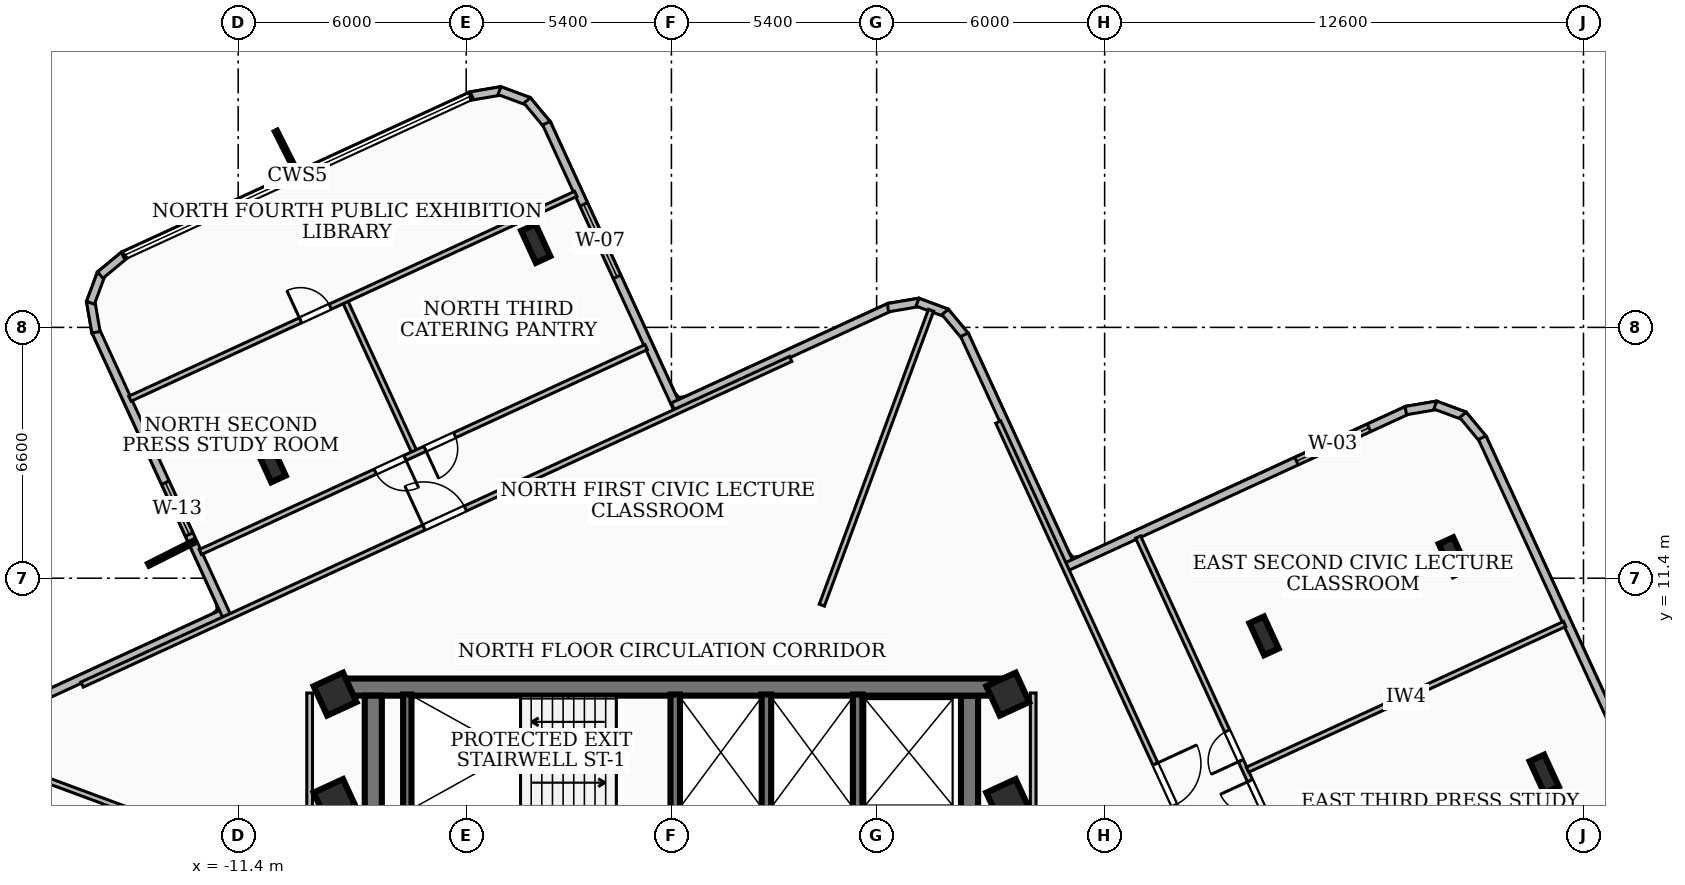
"""IFC4 building model, lengths in metres.
Left out: names, types, materials, properties, quantities, classifications, styles, units other than length and angle.
Written with IfcOpenShell. Run it as: python <this file> out.ifc"""

import sys

from ifc_helpers import new_model, si_unit, direction, frame, frame_2d, origin, origin_2d, place, context, subcontext, project, spatial, rectangle, i_section, extrude, element, fill, save


model = new_model("IFC4")
c1 = context("Model", 3, precision=1e-05, world=origin(), true_north=direction((0.0, 1.0)))
c2 = subcontext(c1, "Body", "Model", "MODEL_VIEW")
j1 = project(units=[si_unit("LENGTHUNIT", "METRE"), si_unit("PLANEANGLEUNIT", "RADIAN")], contexts=[c1])
p1 = place(None, origin())
s1 = spatial("IfcSite", under=j1, at=p1, CompositionType="ELEMENT")
p2 = place(p1, origin())
s2 = spatial("IfcBuilding", under=s1, at=p2, CompositionType="ELEMENT")
p3 = place(p2, frame((0.0, 0.0, 184.68)))
s3 = spatial("IfcBuildingStorey", under=s2, at=p3, CompositionType="ELEMENT", Elevation=184.68)
p4 = place(p3, frame((-8.78, 8.535, 0.0), z_axis=(0.0, 0.0, 1.0), x_axis=(1.0, 0.0, 0.0)))
e1 = element("IfcWall", 1, at=p4, inside=s3, PredefinedType="SHEAR", context=c2, shape_type="SweptSolid", body=[
    extrude(rectangle(XDim=17.56, YDim=0.45, at=frame_2d((8.78, 0.0))), origin(), (0.0, 0.0, 1.0), 3.34),
])
for number, where, z_axis, x_axis in (
    (2, (-7.845, 1.975, 0.0), (0.0, 0.0, 1.0), (0.0, 1.0, 0.0)),
    (3, (7.845, 8.31, 0.0), (0.0, 0.0, 1.0), (0.0, -1.0, 0.0)),
):
    element("IfcWall", number, at=place(p3, frame(where, z_axis=z_axis, x_axis=x_axis)), inside=s3, PredefinedType="SHEAR", context=c2, shape_type="SweptSolid", body=[
        extrude(rectangle(XDim=6.335, YDim=0.45, at=frame_2d((3.167, 0.0))), origin(), (0.0, 0.0, 1.0), 3.34),
    ])
p5 = place(p3, frame((-6.95, 5.28, 0.0), z_axis=(0.0, 0.0, 1.0), x_axis=(0.0, 1.0, 0.0)))
e4 = element("IfcWall", 4, at=p5, inside=s3, PredefinedType="SOLIDWALL", context=c2, shape_type="SweptSolid", body=[
    extrude(rectangle(XDim=3.06, YDim=0.22, at=frame_2d((1.53, 0.0))), origin(), (0.0, 0.0, 1.0), 3.34),
])
for number, where, z_axis, x_axis in (
    (5, (0.1, 5.3, 0.0), (0.0, 0.0, 1.0), (0.0, 1.0, 0.0)),
    (6, (2.5, 5.3, 0.0), (0.0, 0.0, 1.0), (0.0, 1.0, 0.0)),
    (7, (4.9, 5.3, 0.0), (0.0, 0.0, 1.0), (0.0, 1.0, 0.0)),
):
    element("IfcWall", number, at=place(p3, frame(where, z_axis=z_axis, x_axis=x_axis)), inside=s3, PredefinedType="SOLIDWALL", context=c2, shape_type="SweptSolid", body=[
        extrude(rectangle(XDim=3.04, YDim=0.25, at=frame_2d((1.52, 0.0))), origin(), (0.0, 0.0, 1.0), 3.34),
    ])
for number, where, z_axis, x_axis in (
    (8, (-8.85, 5.55, 0.0), (0.0, 0.0, 1.0), (0.909, 0.418, 0.0)),
    (9, (8.85, 5.55, 0.0), (0.0, 0.0, 1.0), (0.909, 0.418, 0.0)),
    (10, (-8.85, 8.35, 0.0), (0.0, 0.0, 1.0), (0.909, 0.418, 0.0)),
    (11, (8.85, 8.35, 0.0), (0.0, 0.0, 1.0), (0.909, 0.418, 0.0)),
):
    element("IfcColumn", number, at=place(p3, frame(where, z_axis=z_axis, x_axis=x_axis)), inside=s3, PredefinedType="COLUMN", context=c2, shape_type="SweptSolid", body=[
        extrude(rectangle(XDim=0.85, YDim=0.85, at=origin_2d()), origin(), (0.0, 0.0, 1.0), 3.6),
    ])
for number, where, z_axis, x_axis in (
    (12, (15.594, 9.883, 0.0), (0.0, 0.0, 1.0), (0.909, 0.418, 0.0)),
    (13, (22.968, 6.248, 0.0), (0.0, 0.0, 1.0), (0.909, 0.418, 0.0)),
    (14, (20.576, 11.967, 0.0), (0.0, 0.0, 1.0), (0.909, 0.418, 0.0)),
    (15, (-3.57, 20.207, 0.0), (0.0, 0.0, 1.0), (0.909, 0.418, 0.0)),
    (16, (-10.533, 14.433, 0.0), (0.0, 0.0, 1.0), (0.909, 0.418, 0.0)),
):
    element("IfcColumn", number, at=place(p3, frame(where, z_axis=z_axis, x_axis=x_axis)), inside=s3, PredefinedType="COLUMN", context=c2, shape_type="SweptSolid", body=[
        extrude(i_section(OverallWidth=0.418, OverallDepth=0.927, WebThickness=0.019, FlangeThickness=0.032, at=origin_2d()), origin(), (0.0, 0.0, 1.0), 3.6),
    ])
p6 = place(p3, frame((-15.911, 0.042, 0.0), z_axis=(0.0, 0.0, 1.0), x_axis=(-0.417479344719, 0.908686412759, 0.0)))
e17 = element("IfcWall", 17, at=p6, inside=s3, PredefinedType="SOLIDWALL", context=c2, shape_type="SweptSolid", body=[
    extrude(rectangle(XDim=6.278, YDim=0.22, at=frame_2d((3.139, 0.0))), origin(), (0.0, 0.0, 1.0), 3.34),
])
p7 = place(p3, frame((-17.806, 7.71, 0.0), z_axis=(0.0, 0.0, 1.0), x_axis=(0.908646468859, 0.417566275734, 0.0)))
e18 = element("IfcWall", 18, at=p7, inside=s3, PredefinedType="SOLIDWALL", context=c2, shape_type="SweptSolid", body=[
    extrude(rectangle(XDim=6.758, YDim=0.22, at=frame_2d((3.379, 0.0))), origin(), (0.0, 0.0, 1.0), 3.34),
])
p8 = place(p3, frame((-11.708, 10.415, 0.0), z_axis=(0.0, 0.0, 1.0), x_axis=(-0.417525901293, 0.908665021748, 0.0)))
e19 = element("IfcWall", 19, at=p8, inside=s3, PredefinedType="SOLIDWALL", context=c2, shape_type="SweptSolid", body=[
    extrude(rectangle(XDim=8.258, YDim=0.22, at=frame_2d((4.129, 0.0))), origin(), (0.0, 0.0, 1.0), 3.34),
])
p9 = place(p8, frame((2.35, 0.0, 0.85)))
e20 = element("IfcOpeningElement", 20, at=p9, cuts=e19, PredefinedType="OPENING", context=c2, shape_type="SweptSolid", body=[
    extrude(rectangle(XDim=1.5, YDim=1.8, at=frame_2d((0.75, 0.9))), frame((0.0, 0.12, 0.0), z_axis=(0.0, -1.0, 0.0), x_axis=(1.0, 0.0, 0.0)), (0.0, 0.0, 1.0), 0.24),
])
p10 = place(p3, frame((-15.142, 17.871, 0.0), z_axis=(0.0, 0.0, 1.0), x_axis=(-0.167575597201, 0.985859228908, 0.0)))
e21 = element("IfcWall", 21, at=p10, inside=s3, PredefinedType="SOLIDWALL", context=c2, shape_type="SweptSolid", body=[
    extrude(rectangle(XDim=0.835, YDim=0.22, at=frame_2d((0.417, 0.0))), origin(), (0.0, 0.0, 1.0), 3.34),
])
p11 = place(p3, frame((-15.287, 18.646, 0.0), z_axis=(0.0, 0.0, 1.0), x_axis=(0.348051853522, 0.937475283546, 0.0)))
e22 = element("IfcWall", 22, at=p11, inside=s3, PredefinedType="SOLIDWALL", context=c2, shape_type="SweptSolid", body=[
    extrude(rectangle(XDim=0.819, YDim=0.22, at=frame_2d((0.41, 0.0))), origin(), (0.0, 0.0, 1.0), 3.34),
])
p12 = place(p3, frame((-15.03, 19.375, 0.0), z_axis=(0.0, 0.0, 1.0), x_axis=(0.770042109777, 0.637993063576, 0.0)))
e23 = element("IfcWall", 23, at=p12, inside=s3, PredefinedType="SOLIDWALL", context=c2, shape_type="SweptSolid", body=[
    extrude(rectangle(XDim=0.834, YDim=0.22, at=frame_2d((0.417, 0.0))), origin(), (0.0, 0.0, 1.0), 3.34),
])
p13 = place(p3, frame((-5.299, 24.084, 0.0), z_axis=(0.0, 0.0, 1.0), x_axis=(0.985810875322, 0.167859816801, 0.0)))
e24 = element("IfcWall", 24, at=p13, inside=s3, PredefinedType="SOLIDWALL", context=c2, shape_type="SweptSolid", body=[
    extrude(rectangle(XDim=0.835, YDim=0.22, at=frame_2d((0.417, 0.0))), origin(), (0.0, 0.0, 1.0), 3.34),
])
p14 = place(p3, frame((-4.524, 24.229, 0.0), z_axis=(0.0, 0.0, 1.0), x_axis=(0.937391870112, -0.348276444578, 0.0)))
e25 = element("IfcWall", 25, at=p14, inside=s3, PredefinedType="SOLIDWALL", context=c2, shape_type="SweptSolid", body=[
    extrude(rectangle(XDim=0.818, YDim=0.22, at=frame_2d((0.409, 0.0))), origin(), (0.0, 0.0, 1.0), 3.34),
])
p15 = place(p3, frame((-3.796, 23.972, 0.0), z_axis=(0.0, 0.0, 1.0), x_axis=(0.638830552104, -0.769347467467, 0.0)))
e26 = element("IfcWall", 26, at=p15, inside=s3, PredefinedType="SOLIDWALL", context=c2, shape_type="SweptSolid", body=[
    extrude(rectangle(XDim=0.834, YDim=0.22, at=frame_2d((0.417, 0.0))), origin(), (0.0, 0.0, 1.0), 3.34),
])
p16 = place(p3, frame((-3.289, 23.372, 0.0), z_axis=(0.0, 0.0, 1.0), x_axis=(0.417514685416, -0.90867017529, 0.0)))
e27 = element("IfcWall", 27, at=p16, inside=s3, PredefinedType="SOLIDWALL", context=c2, shape_type="SweptSolid", body=[
    extrude(rectangle(XDim=8.258, YDim=0.22, at=frame_2d((4.129, 0.0))), origin(), (0.0, 0.0, 1.0), 3.34),
])
p17 = place(p16, frame((2.35, 0.0, 0.85)))
e28 = element("IfcOpeningElement", 28, at=p17, cuts=e27, PredefinedType="OPENING", context=c2, shape_type="SweptSolid", body=[
    extrude(rectangle(XDim=2.1, YDim=1.8, at=frame_2d((1.05, 0.9))), frame((0.0, 0.12, 0.0), z_axis=(0.0, -1.0, 0.0), x_axis=(1.0, 0.0, 0.0)), (0.0, 0.0, 1.0), 0.24),
])
p18 = place(p3, frame((0.042, 15.911, 0.0), z_axis=(0.0, 0.0, 1.0), x_axis=(0.908686412759, 0.417479344719, 0.0)))
e29 = element("IfcWall", 29, at=p18, inside=s3, PredefinedType="SOLIDWALL", context=c2, shape_type="SweptSolid", body=[
    extrude(rectangle(XDim=6.278, YDim=0.22, at=frame_2d((3.139, 0.0))), origin(), (0.0, 0.0, 1.0), 3.34),
])
p19 = place(p3, frame((5.699, 18.518, 0.0), z_axis=(0.0, 0.0, 1.0), x_axis=(0.985892022342, 0.167382556682, 0.0)))
e30 = element("IfcWall", 30, at=p19, inside=s3, PredefinedType="SOLIDWALL", context=c2, shape_type="SweptSolid", body=[
    extrude(rectangle(XDim=0.836, YDim=0.22, at=frame_2d((0.418, 0.0))), origin(), (0.0, 0.0, 1.0), 3.34),
])
p20 = place(p3, frame((6.475, 18.663, 0.0), z_axis=(0.0, 0.0, 1.0), x_axis=(0.937294412261, -0.348538641681, 0.0)))
e31 = element("IfcWall", 31, at=p20, inside=s3, PredefinedType="SOLIDWALL", context=c2, shape_type="SweptSolid", body=[
    extrude(rectangle(XDim=0.818, YDim=0.22, at=frame_2d((0.409, 0.0))), origin(), (0.0, 0.0, 1.0), 3.34),
])
p21 = place(p3, frame((7.203, 18.406, 0.0), z_axis=(0.0, 0.0, 1.0), x_axis=(0.638859924235, -0.769323077261, 0.0)))
e32 = element("IfcWall", 32, at=p21, inside=s3, PredefinedType="SOLIDWALL", context=c2, shape_type="SweptSolid", body=[
    extrude(rectangle(XDim=0.835, YDim=0.22, at=frame_2d((0.417, 0.0))), origin(), (0.0, 0.0, 1.0), 3.34),
])
p22 = place(p3, frame((7.71, 17.806, 0.0), z_axis=(0.0, 0.0, 1.0), x_axis=(0.417566275734, -0.908646468859, 0.0)))
e33 = element("IfcWall", 33, at=p22, inside=s3, PredefinedType="SOLIDWALL", context=c2, shape_type="SweptSolid", body=[
    extrude(rectangle(XDim=6.758, YDim=0.22, at=frame_2d((3.379, 0.0))), origin(), (0.0, 0.0, 1.0), 3.34),
])
p23 = place(p3, frame((10.415, 11.708, 0.0), z_axis=(0.0, 0.0, 1.0), x_axis=(0.908672019386, 0.41751067194, 0.0)))
e34 = element("IfcWall", 34, at=p23, inside=s3, PredefinedType="SOLIDWALL", context=c2, shape_type="SweptSolid", body=[
    extrude(rectangle(XDim=9.858, YDim=0.22, at=frame_2d((4.929, 0.0))), origin(), (0.0, 0.0, 1.0), 3.34),
])
p24 = place(p23, frame((6.64, 0.0, 0.85)))
e35 = element("IfcOpeningElement", 35, at=p24, cuts=e34, PredefinedType="OPENING", context=c2, shape_type="SweptSolid", body=[
    extrude(rectangle(XDim=2.1, YDim=2.0, at=frame_2d((1.05, 1.0))), frame((0.0, 0.12, 0.0), z_axis=(0.0, -1.0, 0.0), x_axis=(1.0, 0.0, 0.0)), (0.0, 0.0, 1.0), 0.24),
])
p25 = place(p3, frame((19.325, 15.81, 0.0), z_axis=(0.0, 0.0, 1.0), x_axis=(0.985859228908, 0.167575597201, 0.0)))
e36 = element("IfcWall", 36, at=p25, inside=s3, PredefinedType="SOLIDWALL", context=c2, shape_type="SweptSolid", body=[
    extrude(rectangle(XDim=0.835, YDim=0.22, at=frame_2d((0.417, 0.0))), origin(), (0.0, 0.0, 1.0), 3.34),
])
p26 = place(p3, frame((20.1, 15.955, 0.0), z_axis=(0.0, 0.0, 1.0), x_axis=(0.937294412261, -0.348538641681, 0.0)))
e37 = element("IfcWall", 37, at=p26, inside=s3, PredefinedType="SOLIDWALL", context=c2, shape_type="SweptSolid", body=[
    extrude(rectangle(XDim=0.818, YDim=0.22, at=frame_2d((0.409, 0.0))), origin(), (0.0, 0.0, 1.0), 3.34),
])
p27 = place(p3, frame((20.828, 15.698, 0.0), z_axis=(0.0, 0.0, 1.0), x_axis=(0.638859924235, -0.769323077261, 0.0)))
e38 = element("IfcWall", 38, at=p27, inside=s3, PredefinedType="SOLIDWALL", context=c2, shape_type="SweptSolid", body=[
    extrude(rectangle(XDim=0.835, YDim=0.22, at=frame_2d((0.417, 0.0))), origin(), (0.0, 0.0, 1.0), 3.34),
])
p28 = place(p3, frame((21.335, 15.098, 0.0), z_axis=(0.0, 0.0, 1.0), x_axis=(0.417474282076, -0.90868873868, 0.0)))
e39 = element("IfcWall", 39, at=p28, inside=s3, PredefinedType="SOLIDWALL", context=c2, shape_type="SweptSolid", body=[
    extrude(rectangle(XDim=10.101, YDim=0.22, at=frame_2d((5.051, 0.0))), origin(), (0.0, 0.0, 1.0), 2.332),
])
p29 = place(p3, frame((-9.52, 1.75, 0.0), z_axis=(0.0, 0.0, 1.0), x_axis=(0.0, 1.0, 0.0)))
e40 = element("IfcWall", 40, at=p29, inside=s3, PredefinedType="PARTITIONING", context=c2, shape_type="SweptSolid", body=[
    extrude(rectangle(XDim=6.63, YDim=0.15, at=frame_2d((3.315, 0.0))), origin(), (0.0, 0.0, 1.0), 3.34),
])
p30 = place(p3, frame((9.52, 1.75, 0.0), z_axis=(0.0, 0.0, 1.0), x_axis=(0.0, 1.0, 0.0)))
e41 = element("IfcWall", 41, at=p30, inside=s3, PredefinedType="PARTITIONING", context=c2, shape_type="SweptSolid", body=[
    extrude(rectangle(XDim=6.63, YDim=0.15, at=frame_2d((3.315, 0.0))), origin(), (0.0, 0.0, 1.0), 2.644),
])
p31 = place(p3, frame((3.959, 10.691, 0.0), z_axis=(0.0, 0.0, 1.0), x_axis=(0.347243238044, 0.937775097576, 0.0)))
e42 = element("IfcWall", 42, at=p31, inside=s3, PredefinedType="PARTITIONING", context=c2, shape_type="SweptSolid", body=[
    extrude(rectangle(XDim=8.274, YDim=0.145, at=frame_2d((4.137, 0.0))), origin(), (0.0, 0.0, 1.0), 3.34),
])
p32 = place(p3, frame((-11.3, 4.185, 0.0), z_axis=(0.0, 0.0, 1.0), x_axis=(-0.937797421925, 0.347182942311, 0.0)))
e43 = element("IfcWall", 43, at=p32, inside=s3, PredefinedType="PARTITIONING", context=c2, shape_type="SweptSolid", body=[
    extrude(rectangle(XDim=7.624, YDim=0.145, at=frame_2d((3.812, 0.0))), origin(), (0.0, 0.0, 1.0), 3.34),
])
p33 = place(p3, frame((8.6, 15.508, 0.0), z_axis=(0.0, 0.0, 1.0), x_axis=(0.41757132443, -0.908644148726, 0.0)))
e44 = element("IfcWall", 44, at=p33, inside=s3, PredefinedType="PARTITIONING", context=c2, shape_type="SweptSolid", body=[
    extrude(rectangle(XDim=20.521, YDim=0.145, at=frame_2d((10.26, 0.0))), origin(), (0.0, 0.0, 1.0), 2.644),
])
p34 = place(p33, frame((9.9, 0.0, 0.0)))
e45 = element("IfcOpeningElement", 45, at=p34, cuts=e44, PredefinedType="OPENING", context=c2, shape_type="SweptSolid", body=[
    extrude(rectangle(XDim=1.2, YDim=2.1, at=frame_2d((0.6, 1.05))), frame((0.0, 0.083, 0.0), z_axis=(0.0, -1.0, 0.0), x_axis=(1.0, 0.0, 0.0)), (0.0, 0.0, 1.0), 0.165),
])
p35 = place(p3, frame((15.159, 6.361, 0.0), z_axis=(0.0, 0.0, 1.0), x_axis=(0.908662943876, 0.417530423355, 0.0)))
e46 = element("IfcWall", 46, at=p35, inside=s3, PredefinedType="PARTITIONING", context=c2, shape_type="SweptSolid", body=[
    extrude(rectangle(XDim=9.185, YDim=0.145, at=frame_2d((4.592, 0.0))), origin(), (0.0, 0.0, 1.0), 3.34),
])
p36 = place(p3, frame((17.67, 0.752, 0.0), z_axis=(0.0, 0.0, 1.0), x_axis=(-0.41749974953, 0.908677037864, 0.0)))
e47 = element("IfcWall", 47, at=p36, inside=s3, PredefinedType="PARTITIONING", context=c2, shape_type="SweptSolid", body=[
    extrude(rectangle(XDim=12.91, YDim=0.145, at=frame_2d((6.455, 0.0))), origin(), (0.0, 0.0, 1.0), 2.644),
])
p37 = place(p36, frame((4.995, 0.0, 0.0)))
e48 = element("IfcOpeningElement", 48, at=p37, cuts=e47, PredefinedType="OPENING", context=c2, shape_type="SweptSolid", body=[
    extrude(rectangle(XDim=0.86, YDim=2.04, at=frame_2d((0.43, 1.02))), frame((0.0, 0.083, 0.0), z_axis=(0.0, -1.0, 0.0), x_axis=(1.0, 0.0, 0.0)), (0.0, 0.0, 1.0), 0.165),
])
p38 = place(p36, frame((6.435, 0.0, 0.0)))
e49 = element("IfcOpeningElement", 49, at=p38, cuts=e47, PredefinedType="OPENING", context=c2, shape_type="SweptSolid", body=[
    extrude(rectangle(XDim=0.86, YDim=2.04, at=frame_2d((0.43, 1.02))), frame((0.0, 0.083, 0.0), z_axis=(0.0, -1.0, 0.0), x_axis=(1.0, 0.0, 0.0)), (0.0, 0.0, 1.0), 0.165),
])
p39 = place(p3, frame((-15.508, 8.6, 0.0), z_axis=(0.0, 0.0, 1.0), x_axis=(0.908644148726, 0.41757132443, 0.0)))
e50 = element("IfcWall", 50, at=p39, inside=s3, PredefinedType="PARTITIONING", context=c2, shape_type="SweptSolid", body=[
    extrude(rectangle(XDim=20.521, YDim=0.145, at=frame_2d((10.26, 0.0))), origin(), (0.0, 0.0, 1.0), 2.644),
])
p40 = place(p39, frame((9.9, 0.0, 0.0)))
e51 = element("IfcOpeningElement", 51, at=p40, cuts=e50, PredefinedType="OPENING", context=c2, shape_type="SweptSolid", body=[
    extrude(rectangle(XDim=1.2, YDim=2.1, at=frame_2d((0.6, 1.05))), frame((0.0, 0.083, 0.0), z_axis=(0.0, -1.0, 0.0), x_axis=(1.0, 0.0, 0.0)), (0.0, 0.0, 1.0), 0.165),
])
p41 = place(p3, frame((-6.773, 14.738, 0.0), z_axis=(0.0, 0.0, 1.0), x_axis=(-0.417333699104, 0.908753312837, 0.0)))
e52 = element("IfcWall", 52, at=p41, inside=s3, PredefinedType="PARTITIONING", context=c2, shape_type="SweptSolid", body=[
    extrude(rectangle(XDim=4.32, YDim=0.145, at=frame_2d((2.16, 0.0))), origin(), (0.0, 0.0, 1.0), 3.34),
])
p42 = place(p3, frame((-0.664, 17.48, 0.0), z_axis=(0.0, 0.0, 1.0), x_axis=(-0.908648339266, -0.417562205605, 0.0)))
e53 = element("IfcWall", 53, at=p42, inside=s3, PredefinedType="PARTITIONING", context=c2, shape_type="SweptSolid", body=[
    extrude(rectangle(XDim=12.91, YDim=0.145, at=frame_2d((6.455, 0.0))), origin(), (0.0, 0.0, 1.0), 2.644),
])
p43 = place(p42, frame((5.545, 0.0, 0.0)))
e54 = element("IfcOpeningElement", 54, at=p43, cuts=e53, PredefinedType="OPENING", context=c2, shape_type="SweptSolid", body=[
    extrude(rectangle(XDim=0.86, YDim=2.04, at=frame_2d((0.43, 1.02))), frame((0.0, 0.083, 0.0), z_axis=(0.0, -1.0, 0.0), x_axis=(1.0, 0.0, 0.0)), (0.0, 0.0, 1.0), 0.165),
])
p44 = place(p42, frame((6.985, 0.0, 0.0)))
e55 = element("IfcOpeningElement", 55, at=p44, cuts=e53, PredefinedType="OPENING", context=c2, shape_type="SweptSolid", body=[
    extrude(rectangle(XDim=0.86, YDim=2.04, at=frame_2d((0.43, 1.02))), frame((0.0, 0.083, 0.0), z_axis=(0.0, -1.0, 0.0), x_axis=(1.0, 0.0, 0.0)), (0.0, 0.0, 1.0), 0.165),
])
p45 = place(p3, frame((-14.249, 16.123, 0.0), z_axis=(0.0, 0.0, 1.0), x_axis=(0.908677037864, 0.41749974953, 0.0)))
e56 = element("IfcWall", 56, at=p45, inside=s3, PredefinedType="PARTITIONING", context=c2, shape_type="SweptSolid", body=[
    extrude(rectangle(XDim=12.91, YDim=0.145, at=frame_2d((6.455, 0.0))), origin(), (0.0, 0.0, 1.0), 3.34),
])
p46 = place(p45, frame((4.94, 0.0, 0.0)))
e57 = element("IfcOpeningElement", 57, at=p46, cuts=e56, PredefinedType="OPENING", context=c2, shape_type="SweptSolid", body=[
    extrude(rectangle(XDim=0.86, YDim=2.04, at=frame_2d((0.43, 1.02))), frame((0.0, 0.083, 0.0), z_axis=(0.0, -1.0, 0.0), x_axis=(1.0, 0.0, 0.0)), (0.0, 0.0, 1.0), 0.165),
])
p47 = place(p9, origin())
e58 = element("IfcWindow", 58, at=p47, inside=s3, PartitioningType="SINGLE_PANEL", PredefinedType="WINDOW", context=c2, shape_type="SweptSolid", body=[
    extrude(rectangle(XDim=1.5, YDim=1.8, at=frame_2d((0.75, 0.9))), frame((0.0, 0.03, 0.0), z_axis=(0.0, -1.0, 0.0), x_axis=(1.0, 0.0, 0.0)), (0.0, 0.0, 1.0), 0.06),
])
fill(e20, e58)
p48 = place(p17, origin())
e59 = element("IfcWindow", 59, at=p48, inside=s3, PartitioningType="SINGLE_PANEL", PredefinedType="WINDOW", context=c2, shape_type="SweptSolid", body=[
    extrude(rectangle(XDim=2.1, YDim=1.8, at=frame_2d((1.05, 0.9))), frame((0.0, 0.03, 0.0), z_axis=(0.0, -1.0, 0.0), x_axis=(1.0, 0.0, 0.0)), (0.0, 0.0, 1.0), 0.06),
])
fill(e28, e59)
p49 = place(p24, origin())
e60 = element("IfcWindow", 60, at=p49, inside=s3, PartitioningType="SINGLE_PANEL", PredefinedType="WINDOW", context=c2, shape_type="SweptSolid", body=[
    extrude(rectangle(XDim=2.1, YDim=2.0, at=frame_2d((1.05, 1.0))), frame((0.0, 0.03, 0.0), z_axis=(0.0, -1.0, 0.0), x_axis=(1.0, 0.0, 0.0)), (0.0, 0.0, 1.0), 0.06),
])
fill(e35, e60)
p50 = place(p34, origin())
e61 = element("IfcDoor", 61, at=p50, inside=s3, OperationType="SINGLE_SWING_LEFT", PredefinedType="DOOR", context=c2, shape_type="SweptSolid", body=[
    extrude(rectangle(XDim=1.2, YDim=2.1, at=frame_2d((0.6, 1.05))), frame((0.0, 0.025, 0.0), z_axis=(0.0, -1.0, 0.0), x_axis=(1.0, 0.0, 0.0)), (0.0, 0.0, 1.0), 0.05),
])
fill(e45, e61)
p51 = place(p37, origin())
e62 = element("IfcDoor", 62, at=p51, inside=s3, OperationType="SINGLE_SWING_RIGHT", PredefinedType="DOOR", context=c2, shape_type="SweptSolid", body=[
    extrude(rectangle(XDim=0.86, YDim=2.04, at=frame_2d((0.43, 1.02))), frame((0.0, 0.025, 0.0), z_axis=(0.0, -1.0, 0.0), x_axis=(1.0, 0.0, 0.0)), (0.0, 0.0, 1.0), 0.05),
])
fill(e48, e62)
p52 = place(p38, origin())
e63 = element("IfcDoor", 63, at=p52, inside=s3, OperationType="SINGLE_SWING_LEFT", PredefinedType="DOOR", context=c2, shape_type="SweptSolid", body=[
    extrude(rectangle(XDim=0.86, YDim=2.04, at=frame_2d((0.43, 1.02))), frame((0.0, 0.025, 0.0), z_axis=(0.0, -1.0, 0.0), x_axis=(1.0, 0.0, 0.0)), (0.0, 0.0, 1.0), 0.05),
])
fill(e49, e63)
p53 = place(p40, origin())
e64 = element("IfcDoor", 64, at=p53, inside=s3, OperationType="SINGLE_SWING_LEFT", PredefinedType="DOOR", context=c2, shape_type="SweptSolid", body=[
    extrude(rectangle(XDim=1.2, YDim=2.1, at=frame_2d((0.6, 1.05))), frame((0.0, 0.025, 0.0), z_axis=(0.0, -1.0, 0.0), x_axis=(1.0, 0.0, 0.0)), (0.0, 0.0, 1.0), 0.05),
])
fill(e51, e64)
p54 = place(p43, origin())
e65 = element("IfcDoor", 65, at=p54, inside=s3, OperationType="SINGLE_SWING_RIGHT", PredefinedType="DOOR", context=c2, shape_type="SweptSolid", body=[
    extrude(rectangle(XDim=0.86, YDim=2.04, at=frame_2d((0.43, 1.02))), frame((0.0, 0.025, 0.0), z_axis=(0.0, -1.0, 0.0), x_axis=(1.0, 0.0, 0.0)), (0.0, 0.0, 1.0), 0.05),
])
fill(e54, e65)
p55 = place(p44, origin())
e66 = element("IfcDoor", 66, at=p55, inside=s3, OperationType="SINGLE_SWING_LEFT", PredefinedType="DOOR", context=c2, shape_type="SweptSolid", body=[
    extrude(rectangle(XDim=0.86, YDim=2.04, at=frame_2d((0.43, 1.02))), frame((0.0, 0.025, 0.0), z_axis=(0.0, -1.0, 0.0), x_axis=(1.0, 0.0, 0.0)), (0.0, 0.0, 1.0), 0.05),
])
fill(e55, e66)
p56 = place(p46, origin())
e67 = element("IfcDoor", 67, at=p56, inside=s3, OperationType="SINGLE_SWING_LEFT", PredefinedType="DOOR", context=c2, shape_type="SweptSolid", body=[
    extrude(rectangle(XDim=0.86, YDim=2.04, at=frame_2d((0.43, 1.02))), frame((0.0, 0.025, 0.0), z_axis=(0.0, -1.0, 0.0), x_axis=(1.0, 0.0, 0.0)), (0.0, 0.0, 1.0), 0.05),
])
fill(e57, e67)
save(model, sys.argv[1])
